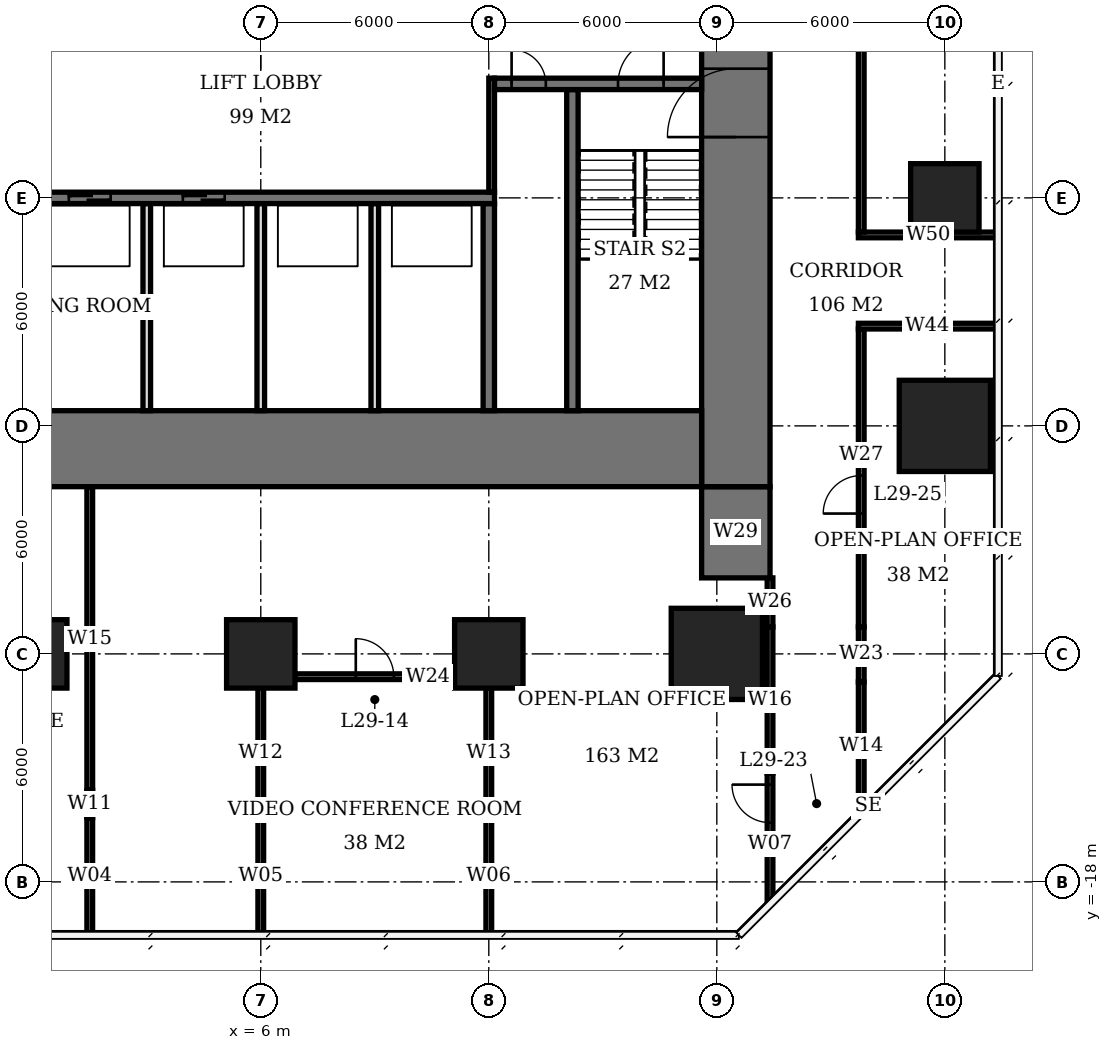
"""IFC4 building model, lengths in metres.
Left out: names, types, materials, properties, quantities, classifications, styles, units other than length and angle.
Written with IfcOpenShell. Run it as: python <this file> out.ifc"""

import sys

from ifc_helpers import new_model, si_unit, direction, frame, frame_2d, origin, origin_2d, place, context, subcontext, project, spatial, rectangle, extrude, element, fill, save


model = new_model("IFC4")
c1 = context("Model", 3, precision=1e-05, world=origin(), true_north=direction((0.0, 1.0)))
c2 = subcontext(c1, "Body", "Model", "MODEL_VIEW")
j1 = project(units=[si_unit("LENGTHUNIT", "METRE"), si_unit("PLANEANGLEUNIT", "RADIAN")], contexts=[c1])
p1 = place(None, origin())
s1 = spatial("IfcSite", under=j1, at=p1, CompositionType="ELEMENT")
p2 = place(p1, origin())
s2 = spatial("IfcBuilding", under=s1, at=p2, CompositionType="ELEMENT")
p3 = place(p2, frame((0.0, 0.0, 121.1)))
s3 = spatial("IfcBuildingStorey", under=s2, at=p3, CompositionType="ELEMENT", Elevation=121.1)
for number, where, z_axis, x_axis in (
    (1, (0.0, -12.0, 0.0), (0.0, 0.0, 1.0), (1.0, 0.0, 0.0)),
    (2, (6.0, -12.0, 0.0), (0.0, 0.0, 1.0), (1.0, 0.0, 0.0)),
    (3, (12.0, -12.0, 0.0), (0.0, 0.0, 1.0), (1.0, 0.0, 0.0)),
):
    element("IfcColumn", number, at=place(p3, frame(where, z_axis=z_axis, x_axis=x_axis)), inside=s3, PredefinedType="COLUMN", context=c2, shape_type="SweptSolid", body=[
        extrude(rectangle(XDim=1.8, YDim=1.8, at=origin_2d()), origin(), (0.0, 0.0, 1.0), 3.9),
    ])
for number, where, z_axis, x_axis in (
    (4, (18.0, -12.0, 0.0), (0.0, 0.0, 1.0), (1.0, 0.0, 0.0)),
    (5, (24.0, -6.0, 0.0), (0.0, 0.0, 1.0), (1.0, 0.0, 0.0)),
):
    element("IfcColumn", number, at=place(p3, frame(where, z_axis=z_axis, x_axis=x_axis)), inside=s3, PredefinedType="COLUMN", context=c2, shape_type="SweptSolid", body=[
        extrude(rectangle(XDim=2.4, YDim=2.4, at=origin_2d()), origin(), (0.0, 0.0, 1.0), 3.9),
    ])
p4 = place(p3, frame((24.0, 0.0, 0.0), z_axis=(0.0, 0.0, 1.0), x_axis=(1.0, 0.0, 0.0)))
e6 = element("IfcColumn", 6, at=p4, inside=s3, PredefinedType="COLUMN", context=c2, shape_type="SweptSolid", body=[
    extrude(rectangle(XDim=1.8, YDim=1.8, at=origin_2d()), origin(), (0.0, 0.0, 1.0), 3.9),
])
p5 = place(p3, frame((-5.6, -6.6, 0.0), z_axis=(0.0, 0.0, 1.0), x_axis=(1.0, 0.0, 0.0)))
e7 = element("IfcWall", 7, at=p5, inside=s3, PredefinedType="SHEAR", context=c2, shape_type="SweptSolid", body=[
    extrude(rectangle(XDim=23.2, YDim=2.0, at=frame_2d((11.6, 0.0))), origin(), (0.0, 0.0, 1.0), 3.9),
])
p6 = place(p3, frame((18.5, -7.6, 0.0), z_axis=(0.0, 0.0, 1.0), x_axis=(0.0, 1.0, 0.0)))
e8 = element("IfcWall", 8, at=p6, inside=s3, PredefinedType="SHEAR", context=c2, shape_type="SweptSolid", body=[
    extrude(rectangle(XDim=21.2, YDim=1.8, at=frame_2d((10.6, 0.0))), origin(), (0.0, 0.0, 1.0), 3.9),
])
p7 = place(p6, frame((9.2, 0.0, 0.0)))
e9 = element("IfcOpeningElement", 9, at=p7, cuts=e8, PredefinedType="OPENING", context=c2, shape_type="SweptSolid", body=[
    extrude(rectangle(XDim=1.8, YDim=2.4, at=frame_2d((0.9, 1.2))), frame((0.0, 0.91, 0.0), z_axis=(0.0, -1.0, 0.0), x_axis=(1.0, 0.0, 0.0)), (0.0, 0.0, 1.0), 1.82),
])
p8 = place(p3, frame((18.5, -10.0, 0.0), z_axis=(0.0, 0.0, 1.0), x_axis=(0.0, 1.0, 0.0)))
e10 = element("IfcWall", 10, at=p8, inside=s3, PredefinedType="SHEAR", context=c2, shape_type="SweptSolid", body=[
    extrude(rectangle(XDim=2.4, YDim=1.8, at=frame_2d((1.2, 0.0))), origin(), (0.0, 0.0, 1.0), 3.9),
])
p9 = place(p3, frame((-5.6, 0.0, 0.0), z_axis=(0.0, 0.0, 1.0), x_axis=(1.0, 0.0, 0.0)))
e11 = element("IfcWall", 11, at=p9, inside=s3, PredefinedType="SHEAR", context=c2, shape_type="SweptSolid", body=[
    extrude(rectangle(XDim=17.75, YDim=0.3, at=frame_2d((8.875, 0.0))), origin(), (0.0, 0.0, 1.0), 3.9),
])
p10 = place(p9, frame((0.6, 0.0, 0.0)))
e12 = element("IfcOpeningElement", 12, at=p10, cuts=e11, PredefinedType="OPENING", context=c2, shape_type="SweptSolid", body=[
    extrude(rectangle(XDim=0.9, YDim=2.1, at=frame_2d((0.45, 1.05))), frame((0.0, 0.16, 0.0), z_axis=(0.0, -1.0, 0.0), x_axis=(1.0, 0.0, 0.0)), (0.0, 0.0, 1.0), 0.32),
])
p11 = place(p9, frame((3.7, 0.0, 0.0)))
e13 = element("IfcOpeningElement", 13, at=p11, cuts=e11, PredefinedType="OPENING", context=c2, shape_type="SweptSolid", body=[
    extrude(rectangle(XDim=0.9, YDim=2.1, at=frame_2d((0.45, 1.05))), frame((0.0, 0.16, 0.0), z_axis=(0.0, -1.0, 0.0), x_axis=(1.0, 0.0, 0.0)), (0.0, 0.0, 1.0), 0.32),
])
p12 = place(p9, frame((6.55, 0.0, 0.0)))
e14 = element("IfcOpeningElement", 14, at=p12, cuts=e11, PredefinedType="OPENING", context=c2, shape_type="SweptSolid", body=[
    extrude(rectangle(XDim=1.1, YDim=2.1, at=frame_2d((0.55, 1.05))), frame((0.0, 0.16, 0.0), z_axis=(0.0, -1.0, 0.0), x_axis=(1.0, 0.0, 0.0)), (0.0, 0.0, 1.0), 0.32),
])
p13 = place(p9, frame((9.55, 0.0, 0.0)))
e15 = element("IfcOpeningElement", 15, at=p13, cuts=e11, PredefinedType="OPENING", context=c2, shape_type="SweptSolid", body=[
    extrude(rectangle(XDim=1.1, YDim=2.1, at=frame_2d((0.55, 1.05))), frame((0.0, 0.16, 0.0), z_axis=(0.0, -1.0, 0.0), x_axis=(1.0, 0.0, 0.0)), (0.0, 0.0, 1.0), 0.32),
])
p14 = place(p3, frame((12.15, 3.0, 0.0), z_axis=(0.0, 0.0, 1.0), x_axis=(1.0, 0.0, 0.0)))
e16 = element("IfcWall", 16, at=p14, inside=s3, PredefinedType="SHEAR", context=c2, shape_type="SweptSolid", body=[
    extrude(rectangle(XDim=5.45, YDim=0.3, at=frame_2d((2.725, 0.0))), origin(), (0.0, 0.0, 1.0), 3.9),
])
p15 = place(p14, frame((3.25, 0.0, 0.0)))
e17 = element("IfcOpeningElement", 17, at=p15, cuts=e16, PredefinedType="OPENING", context=c2, shape_type="SweptSolid", body=[
    extrude(rectangle(XDim=1.2, YDim=2.1, at=frame_2d((0.6, 1.05))), frame((0.0, 0.16, 0.0), z_axis=(0.0, -1.0, 0.0), x_axis=(1.0, 0.0, 0.0)), (0.0, 0.0, 1.0), 0.32),
])
p16 = place(p14, frame((0.45, 0.0, 0.0)))
e18 = element("IfcOpeningElement", 18, at=p16, cuts=e16, PredefinedType="OPENING", context=c2, shape_type="SweptSolid", body=[
    extrude(rectangle(XDim=0.9, YDim=2.1, at=frame_2d((0.45, 1.05))), frame((0.0, 0.16, 0.0), z_axis=(0.0, -1.0, 0.0), x_axis=(1.0, 0.0, 0.0)), (0.0, 0.0, 1.0), 0.32),
])
p17 = place(p3, frame((12.0, -5.6, 0.0), z_axis=(0.0, 0.0, 1.0), x_axis=(0.0, 1.0, 0.0)))
e19 = element("IfcWall", 19, at=p17, inside=s3, PredefinedType="SHEAR", context=c2, shape_type="SweptSolid", body=[
    extrude(rectangle(XDim=5.45, YDim=0.3, at=frame_2d((2.725, 0.0))), origin(), (0.0, 0.0, 1.0), 3.9),
])
p18 = place(p3, frame((14.2, -5.6, 0.0), z_axis=(0.0, 0.0, 1.0), x_axis=(0.0, 1.0, 0.0)))
e20 = element("IfcWall", 20, at=p18, inside=s3, PredefinedType="SHEAR", context=c2, shape_type="SweptSolid", body=[
    extrude(rectangle(XDim=8.45, YDim=0.3, at=frame_2d((4.225, 0.0))), origin(), (0.0, 0.0, 1.0), 3.9),
])
for number, where, z_axis, x_axis in (
    (21, (3.0, -5.6, 0.0), (0.0, 0.0, 1.0), (0.0, 1.0, 0.0)),
    (22, (6.0, -5.6, 0.0), (0.0, 0.0, 1.0), (0.0, 1.0, 0.0)),
    (23, (9.0, -5.6, 0.0), (0.0, 0.0, 1.0), (0.0, 1.0, 0.0)),
):
    element("IfcWall", number, at=place(p3, frame(where, z_axis=z_axis, x_axis=x_axis)), inside=s3, PredefinedType="SOLIDWALL", context=c2, shape_type="SweptSolid", body=[
        extrude(rectangle(XDim=5.45, YDim=0.2, at=frame_2d((2.725, 0.0))), origin(), (0.0, 0.0, 1.0), 3.9),
    ])
p19 = place(p3, frame((6.9, -12.6, 0.0), z_axis=(0.0, 0.0, 1.0), x_axis=(1.0, 0.0, 0.0)))
e24 = element("IfcWall", 24, at=p19, inside=s3, PredefinedType="PARTITIONING", context=c2, shape_type="SweptSolid", body=[
    extrude(rectangle(XDim=4.2, YDim=0.15, at=frame_2d((2.1, 0.0))), origin(), (0.0, 0.0, 1.0), 3.65),
])
p20 = place(p19, frame((1.6, 0.0, 0.0)))
e25 = element("IfcOpeningElement", 25, at=p20, cuts=e24, PredefinedType="OPENING", context=c2, shape_type="SweptSolid", body=[
    extrude(rectangle(XDim=1.0, YDim=2.1, at=frame_2d((0.5, 1.05))), frame((0.0, 0.085, 0.0), z_axis=(0.0, -1.0, 0.0), x_axis=(1.0, 0.0, 0.0)), (0.0, 0.0, 1.0), 0.17),
])
p21 = place(p3, frame((6.0, -19.4, 0.0), z_axis=(0.0, 0.0, 1.0), x_axis=(0.0, 1.0, 0.0)))
e26 = element("IfcWall", 26, at=p21, inside=s3, PredefinedType="PARTITIONING", context=c2, shape_type="SweptSolid", body=[
    extrude(rectangle(XDim=3.09, YDim=0.15, at=frame_2d((1.545, 0.0))), origin(), (0.0, 0.0, 1.0), 3.65),
])
p22 = place(p3, frame((6.0, -16.31, 0.0), z_axis=(0.0, 0.0, 1.0), x_axis=(0.0, 1.0, 0.0)))
e27 = element("IfcWall", 27, at=p22, inside=s3, PredefinedType="PARTITIONING", context=c2, shape_type="SweptSolid", body=[
    extrude(rectangle(XDim=3.41, YDim=0.15, at=frame_2d((1.705, 0.0))), origin(), (0.0, 0.0, 1.0), 2.65),
])
p23 = place(p3, frame((12.0, -19.4, 0.0), z_axis=(0.0, 0.0, 1.0), x_axis=(0.0, 1.0, 0.0)))
e28 = element("IfcWall", 28, at=p23, inside=s3, PredefinedType="PARTITIONING", context=c2, shape_type="SweptSolid", body=[
    extrude(rectangle(XDim=3.09, YDim=0.15, at=frame_2d((1.545, 0.0))), origin(), (0.0, 0.0, 1.0), 3.65),
])
p24 = place(p3, frame((12.0, -16.31, 0.0), z_axis=(0.0, 0.0, 1.0), x_axis=(0.0, 1.0, 0.0)))
e29 = element("IfcWall", 29, at=p24, inside=s3, PredefinedType="PARTITIONING", context=c2, shape_type="SweptSolid", body=[
    extrude(rectangle(XDim=3.41, YDim=0.15, at=frame_2d((1.705, 0.0))), origin(), (0.0, 0.0, 1.0), 2.65),
])
p25 = place(p3, frame((1.5, -19.4, 0.0), z_axis=(0.0, 0.0, 1.0), x_axis=(0.0, 1.0, 0.0)))
e30 = element("IfcWall", 30, at=p25, inside=s3, PredefinedType="PARTITIONING", context=c2, shape_type="SweptSolid", body=[
    extrude(rectangle(XDim=3.09, YDim=0.15, at=frame_2d((1.545, 0.0))), origin(), (0.0, 0.0, 1.0), 3.65),
])
p26 = place(p3, frame((1.5, -16.31, 0.0), z_axis=(0.0, 0.0, 1.0), x_axis=(0.0, 1.0, 0.0)))
e31 = element("IfcWall", 31, at=p26, inside=s3, PredefinedType="PARTITIONING", context=c2, shape_type="SweptSolid", body=[
    extrude(rectangle(XDim=0.72, YDim=0.15, at=frame_2d((0.36, 0.0))), origin(), (0.0, 0.0, 1.0), 2.65),
])
p27 = place(p3, frame((1.5, -15.59, 0.0), z_axis=(0.0, 0.0, 1.0), x_axis=(0.0, 1.0, 0.0)))
e32 = element("IfcWall", 32, at=p27, inside=s3, PredefinedType="PARTITIONING", context=c2, shape_type="SweptSolid", body=[
    extrude(rectangle(XDim=7.99, YDim=0.15, at=frame_2d((3.995, 0.0))), origin(), (0.0, 0.0, 1.0), 3.65),
])
p28 = place(p3, frame((19.4, -18.489, 0.0), z_axis=(0.0, 0.0, 1.0), x_axis=(0.0, 1.0, 0.0)))
e33 = element("IfcWall", 33, at=p28, inside=s3, PredefinedType="PARTITIONING", context=c2, shape_type="SweptSolid", body=[
    extrude(rectangle(XDim=3.349, YDim=0.15, at=frame_2d((1.675, 0.0))), origin(), (0.0, 0.0, 1.0), 3.65),
])
p29 = place(p28, frame((2.049, 0.0, 0.0)))
e34 = element("IfcOpeningElement", 34, at=p29, cuts=e33, PredefinedType="OPENING", context=c2, shape_type="SweptSolid", body=[
    extrude(rectangle(XDim=1.0, YDim=2.1, at=frame_2d((0.5, 1.05))), frame((0.0, 0.085, 0.0), z_axis=(0.0, -1.0, 0.0), x_axis=(1.0, 0.0, 0.0)), (0.0, 0.0, 1.0), 0.17),
])
p30 = place(p3, frame((19.4, -15.14, 0.0), z_axis=(0.0, 0.0, 1.0), x_axis=(0.0, 1.0, 0.0)))
e35 = element("IfcWall", 35, at=p30, inside=s3, PredefinedType="PARTITIONING", context=c2, shape_type="SweptSolid", body=[
    extrude(rectangle(XDim=3.85, YDim=0.15, at=frame_2d((1.925, 0.0))), origin(), (0.0, 0.0, 1.0), 2.65),
])
p31 = place(p3, frame((19.4, -11.29, 0.0), z_axis=(0.0, 0.0, 1.0), x_axis=(0.0, 1.0, 0.0)))
e36 = element("IfcWall", 36, at=p31, inside=s3, PredefinedType="PARTITIONING", context=c2, shape_type="SweptSolid", body=[
    extrude(rectangle(XDim=1.29, YDim=0.15, at=frame_2d((0.645, 0.0))), origin(), (0.0, 0.0, 1.0), 3.65),
])
p32 = place(p3, frame((21.8, -16.089, 0.0), z_axis=(0.0, 0.0, 1.0), x_axis=(0.0, 1.0, 0.0)))
e37 = element("IfcWall", 37, at=p32, inside=s3, PredefinedType="PARTITIONING", context=c2, shape_type="SweptSolid", body=[
    extrude(rectangle(XDim=3.349, YDim=0.15, at=frame_2d((1.675, 0.0))), origin(), (0.0, 0.0, 1.0), 3.65),
])
p33 = place(p3, frame((21.8, -12.74, 0.0), z_axis=(0.0, 0.0, 1.0), x_axis=(0.0, 1.0, 0.0)))
e38 = element("IfcWall", 38, at=p33, inside=s3, PredefinedType="PARTITIONING", context=c2, shape_type="SweptSolid", body=[
    extrude(rectangle(XDim=1.45, YDim=0.15, at=frame_2d((0.725, 0.0))), origin(), (0.0, 0.0, 1.0), 2.65),
])
p34 = place(p3, frame((21.8, -11.29, 0.0), z_axis=(0.0, 0.0, 1.0), x_axis=(0.0, 1.0, 0.0)))
e39 = element("IfcWall", 39, at=p34, inside=s3, PredefinedType="PARTITIONING", context=c2, shape_type="SweptSolid", body=[
    extrude(rectangle(XDim=7.84, YDim=0.15, at=frame_2d((3.92, 0.0))), origin(), (0.0, 0.0, 1.0), 3.65),
])
p35 = place(p34, frame((2.983, 0.0, 0.0)))
e40 = element("IfcOpeningElement", 40, at=p35, cuts=e39, PredefinedType="OPENING", context=c2, shape_type="SweptSolid", body=[
    extrude(rectangle(XDim=1.0, YDim=2.1, at=frame_2d((0.5, 1.05))), frame((0.0, 0.085, 0.0), z_axis=(0.0, -1.0, 0.0), x_axis=(1.0, 0.0, 0.0)), (0.0, 0.0, 1.0), 0.17),
])
p36 = place(p3, frame((21.725, -3.375, 0.0), z_axis=(0.0, 0.0, 1.0), x_axis=(1.0, 0.0, 0.0)))
e41 = element("IfcWall", 41, at=p36, inside=s3, PredefinedType="PARTITIONING", context=c2, shape_type="SweptSolid", body=[
    extrude(rectangle(XDim=3.625, YDim=0.15, at=frame_2d((1.812, 0.0))), origin(), (0.0, 0.0, 1.0), 3.65),
])
p37 = place(p3, frame((21.8, -0.9, 0.0), z_axis=(0.0, 0.0, 1.0), x_axis=(0.0, 1.0, 0.0)))
e42 = element("IfcWall", 42, at=p37, inside=s3, PredefinedType="PARTITIONING", context=c2, shape_type="SweptSolid", body=[
    extrude(rectangle(XDim=22.989, YDim=0.15, at=frame_2d((11.495, 0.0))), origin(), (0.0, 0.0, 1.0), 3.65),
])
p38 = place(p37, frame((14.384, 0.0, 0.0)))
e43 = element("IfcOpeningElement", 43, at=p38, cuts=e42, PredefinedType="OPENING", context=c2, shape_type="SweptSolid", body=[
    extrude(rectangle(XDim=1.0, YDim=2.1, at=frame_2d((0.5, 1.05))), frame((0.0, 0.085, 0.0), z_axis=(0.0, -1.0, 0.0), x_axis=(1.0, 0.0, 0.0)), (0.0, 0.0, 1.0), 0.17),
])
p39 = place(p3, frame((21.725, -0.975, 0.0), z_axis=(0.0, 0.0, 1.0), x_axis=(1.0, 0.0, 0.0)))
e44 = element("IfcWall", 44, at=p39, inside=s3, PredefinedType="PARTITIONING", context=c2, shape_type="SweptSolid", body=[
    extrude(rectangle(XDim=3.675, YDim=0.15, at=frame_2d((1.837, 0.0))), origin(), (0.0, 0.0, 1.0), 3.65),
])
p40 = place(p3, frame((12.075, 0.15, 0.0), z_axis=(0.0, 0.0, 1.0), x_axis=(0.0, 1.0, 0.0)))
e45 = element("IfcWall", 45, at=p40, inside=s3, PredefinedType="PARTITIONING", context=c2, shape_type="SweptSolid", body=[
    extrude(rectangle(XDim=3.0, YDim=0.15, at=frame_2d((1.5, 0.0))), origin(), (0.0, 0.0, 1.0), 3.65),
])
p41 = place(p7, origin())
e46 = element("IfcDoor", 46, at=p41, inside=s3, OperationType="DOUBLE_DOOR_SINGLE_SWING", PredefinedType="DOOR", context=c2, shape_type="SweptSolid", body=[
    extrude(rectangle(XDim=1.8, YDim=2.4, at=frame_2d((0.9, 1.2))), frame((0.0, 0.025, 0.0), z_axis=(0.0, -1.0, 0.0), x_axis=(1.0, 0.0, 0.0)), (0.0, 0.0, 1.0), 0.05),
])
fill(e9, e46)
p42 = place(p15, origin())
e47 = element("IfcDoor", 47, at=p42, inside=s3, OperationType="SINGLE_SWING_RIGHT", PredefinedType="DOOR", context=c2, shape_type="SweptSolid", body=[
    extrude(rectangle(XDim=1.2, YDim=2.1, at=frame_2d((0.6, 1.05))), frame((0.0, 0.025, 0.0), z_axis=(0.0, -1.0, 0.0), x_axis=(1.0, 0.0, 0.0)), (0.0, 0.0, 1.0), 0.05),
])
fill(e17, e47)
p43 = place(p16, origin())
e48 = element("IfcDoor", 48, at=p43, inside=s3, OperationType="SINGLE_SWING_LEFT", PredefinedType="DOOR", context=c2, shape_type="SweptSolid", body=[
    extrude(rectangle(XDim=0.9, YDim=2.1, at=frame_2d((0.45, 1.05))), frame((0.0, 0.025, 0.0), z_axis=(0.0, -1.0, 0.0), x_axis=(1.0, 0.0, 0.0)), (0.0, 0.0, 1.0), 0.05),
])
fill(e18, e48)
p44 = place(p12, origin())
e49 = element("IfcDoor", 49, at=p44, inside=s3, OperationType="DOUBLE_DOOR_SLIDING", PredefinedType="USERDEFINED", context=c2, shape_type="SweptSolid", body=[
    extrude(rectangle(XDim=1.1, YDim=2.1, at=frame_2d((0.55, 1.05))), frame((0.0, 0.025, 0.0), z_axis=(0.0, -1.0, 0.0), x_axis=(1.0, 0.0, 0.0)), (0.0, 0.0, 1.0), 0.05),
])
fill(e14, e49)
p45 = place(p13, origin())
e50 = element("IfcDoor", 50, at=p45, inside=s3, OperationType="DOUBLE_DOOR_SLIDING", PredefinedType="USERDEFINED", context=c2, shape_type="SweptSolid", body=[
    extrude(rectangle(XDim=1.1, YDim=2.1, at=frame_2d((0.55, 1.05))), frame((0.0, 0.025, 0.0), z_axis=(0.0, -1.0, 0.0), x_axis=(1.0, 0.0, 0.0)), (0.0, 0.0, 1.0), 0.05),
])
fill(e15, e50)
p46 = place(p20, origin())
e51 = element("IfcDoor", 51, at=p46, inside=s3, OperationType="SINGLE_SWING_LEFT", PredefinedType="DOOR", context=c2, shape_type="SweptSolid", body=[
    extrude(rectangle(XDim=1.0, YDim=2.1, at=frame_2d((0.5, 1.05))), frame((0.0, 0.025, 0.0), z_axis=(0.0, -1.0, 0.0), x_axis=(1.0, 0.0, 0.0)), (0.0, 0.0, 1.0), 0.05),
])
fill(e25, e51)
p47 = place(p29, origin())
e52 = element("IfcDoor", 52, at=p47, inside=s3, OperationType="SINGLE_SWING_RIGHT", PredefinedType="DOOR", context=c2, shape_type="SweptSolid", body=[
    extrude(rectangle(XDim=1.0, YDim=2.1, at=frame_2d((0.5, 1.05))), frame((0.0, 0.025, 0.0), z_axis=(0.0, -1.0, 0.0), x_axis=(1.0, 0.0, 0.0)), (0.0, 0.0, 1.0), 0.05),
])
fill(e34, e52)
p48 = place(p35, origin())
e53 = element("IfcDoor", 53, at=p48, inside=s3, OperationType="SINGLE_SWING_LEFT", PredefinedType="DOOR", context=c2, shape_type="SweptSolid", body=[
    extrude(rectangle(XDim=1.0, YDim=2.1, at=frame_2d((0.5, 1.05))), frame((0.0, 0.025, 0.0), z_axis=(0.0, -1.0, 0.0), x_axis=(1.0, 0.0, 0.0)), (0.0, 0.0, 1.0), 0.05),
])
fill(e40, e53)
save(model, sys.argv[1])
